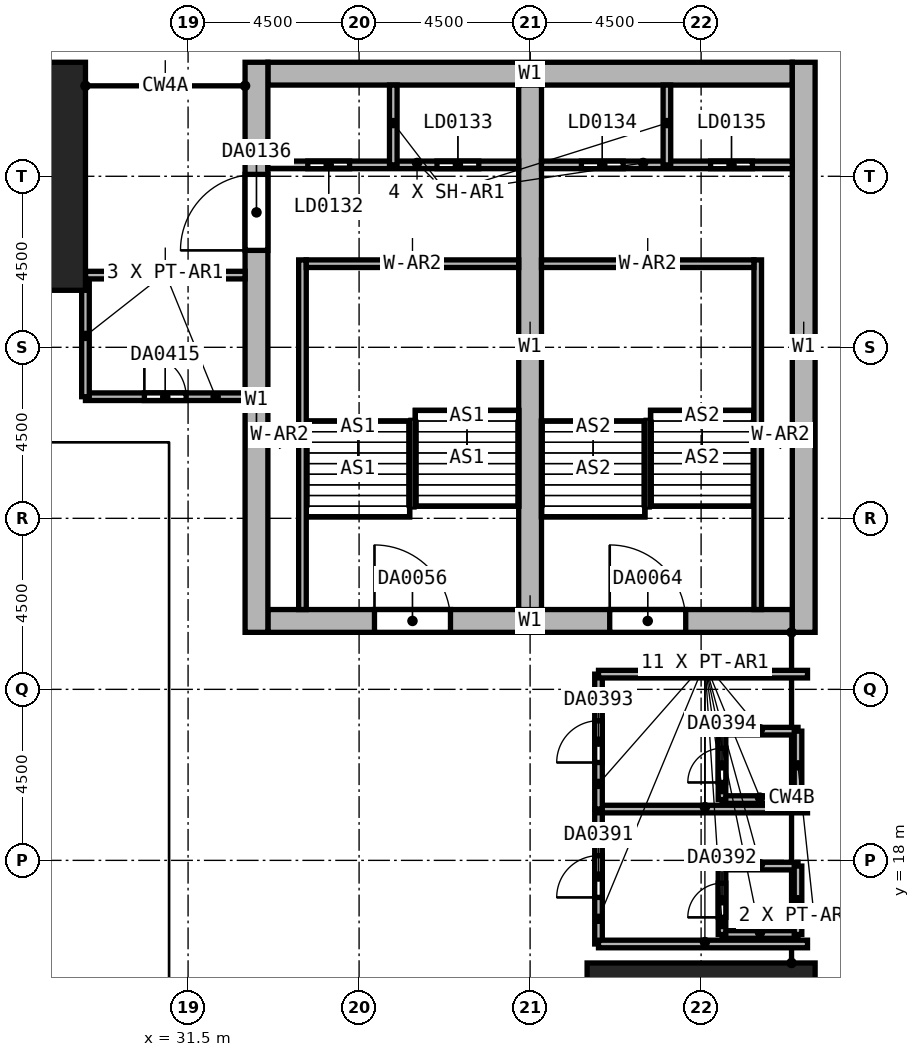
"""IFC4 building model, lengths in metres.
Left out: names, types, materials, properties, quantities, classifications, styles, units other than length and angle.
Written with IfcOpenShell. Run it as: python <this file> out.ifc"""

import sys

from ifc_helpers import new_model, si_unit, direction, frame, frame_2d, origin, origin_2d, place, context, subcontext, project, spatial, rectangle, extrude, element, fill, save


model = new_model("IFC4")
c1 = context("Model", 3, precision=1e-05, world=origin(), true_north=direction((0.0, 1.0)))
c2 = subcontext(c1, "Body", "Model", "MODEL_VIEW")
j1 = project(units=[si_unit("LENGTHUNIT", "METRE"), si_unit("PLANEANGLEUNIT", "RADIAN")], contexts=[c1])
p1 = place(None, origin())
s1 = spatial("IfcSite", under=j1, at=p1, CompositionType="ELEMENT")
p2 = place(p1, origin())
s2 = spatial("IfcBuilding", under=s1, at=p2, CompositionType="ELEMENT")
p3 = place(p2, frame((0.0, 0.0, 25.0)))
s3 = spatial("IfcBuildingStorey", under=s2, at=p3, CompositionType="ELEMENT", Elevation=25.0)
for number, where, z_axis, x_axis in (
    (1, (27.0, 36.0, 0.0), (0.0, 0.0, 1.0), (1.0, 0.0, 0.0)),
    (2, (45.0, 13.5, 0.0), (0.0, 0.0, 1.0), (0.0, 1.0, 0.0)),
):
    element("IfcColumn", number, at=place(p3, frame(where, z_axis=z_axis, x_axis=x_axis)), inside=s3, PredefinedType="COLUMN", context=c2, shape_type="SweptSolid", body=[
        extrude(rectangle(XDim=3.6, YDim=6.0, at=origin_2d()), origin(), (0.0, 0.0, 1.0), 6.0),
    ])
p4 = place(p3, frame((33.6, 38.7, 0.0), z_axis=(0.0, 0.0, 1.0), x_axis=(1.0, 0.0, 0.0)))
e3 = element("IfcWall", 3, at=p4, inside=s3, PredefinedType="SHEAR", context=c2, shape_type="SweptSolid", body=[
    extrude(rectangle(XDim=13.8, YDim=0.6, at=frame_2d((6.9, 0.0))), origin(), (0.0, 0.0, 1.0), 6.0),
])
p5 = place(p3, frame((33.6, 24.3, 0.0), z_axis=(0.0, 0.0, 1.0), x_axis=(1.0, 0.0, 0.0)))
e4 = element("IfcWall", 4, at=p5, inside=s3, PredefinedType="SHEAR", context=c2, shape_type="SweptSolid", body=[
    extrude(rectangle(XDim=13.8, YDim=0.6, at=frame_2d((6.9, 0.0))), origin(), (0.0, 0.0, 1.0), 6.0),
])
p6 = place(p5, frame((2.805, 0.0, 0.0)))
e5 = element("IfcOpeningElement", 5, at=p6, cuts=e4, PredefinedType="OPENING", context=c2, shape_type="SweptSolid", body=[
    extrude(rectangle(XDim=2.0, YDim=2.4, at=frame_2d((1.0, 1.2))), frame((0.0, 0.3, 0.0), z_axis=(0.0, -1.0, 0.0), x_axis=(1.0, 0.0, 0.0)), (0.0, 0.0, 1.0), 0.6),
])
p7 = place(p5, frame((8.995, 0.0, 0.0)))
e6 = element("IfcOpeningElement", 6, at=p7, cuts=e4, PredefinedType="OPENING", context=c2, shape_type="SweptSolid", body=[
    extrude(rectangle(XDim=2.0, YDim=2.4, at=frame_2d((1.0, 1.2))), frame((0.0, 0.3, 0.0), z_axis=(0.0, -1.0, 0.0), x_axis=(1.0, 0.0, 0.0)), (0.0, 0.0, 1.0), 0.6),
])
p8 = place(p3, frame((33.3, 24.0, 0.0), z_axis=(0.0, 0.0, 1.0), x_axis=(0.0, 1.0, 0.0)))
e7 = element("IfcWall", 7, at=p8, inside=s3, PredefinedType="SHEAR", context=c2, shape_type="SweptSolid", body=[
    extrude(rectangle(XDim=15.0, YDim=0.6, at=frame_2d((7.5, 0.0))), origin(), (0.0, 0.0, 1.0), 6.0),
])
p9 = place(p8, frame((10.05, 0.0, 0.0)))
e8 = element("IfcOpeningElement", 8, at=p9, cuts=e7, PredefinedType="OPENING", context=c2, shape_type="SweptSolid", body=[
    extrude(rectangle(XDim=2.0, YDim=2.4, at=frame_2d((1.0, 1.2))), frame((0.0, 0.3, 0.0), z_axis=(0.0, -1.0, 0.0), x_axis=(1.0, 0.0, 0.0)), (0.0, 0.0, 1.0), 0.6),
])
p10 = place(p3, frame((47.7, 24.0, 0.0), z_axis=(0.0, 0.0, 1.0), x_axis=(0.0, 1.0, 0.0)))
e9 = element("IfcWall", 9, at=p10, inside=s3, PredefinedType="SHEAR", context=c2, shape_type="SweptSolid", body=[
    extrude(rectangle(XDim=15.0, YDim=0.6, at=frame_2d((7.5, 0.0))), origin(), (0.0, 0.0, 1.0), 6.0),
])
p11 = place(p3, frame((40.5, 24.6, 0.0), z_axis=(0.0, 0.0, 1.0), x_axis=(0.0, 1.0, 0.0)))
e10 = element("IfcWall", 10, at=p11, inside=s3, PredefinedType="SHEAR", context=c2, shape_type="SweptSolid", body=[
    extrude(rectangle(XDim=13.8, YDim=0.6, at=frame_2d((6.9, 0.0))), origin(), (0.0, 0.0, 1.0), 6.0),
])
p12 = place(p3, frame((34.51, 24.6, 0.0), z_axis=(0.0, 0.0, 1.0), x_axis=(0.0, 1.0, 0.0)))
e11 = element("IfcWall", 11, at=p12, inside=s3, PredefinedType="SOLIDWALL", context=c2, shape_type="SweptSolid", body=[
    extrude(rectangle(XDim=9.2, YDim=0.2, at=frame_2d((4.6, 0.0))), origin(), (0.0, 0.0, 1.0), 6.0),
])
p13 = place(p3, frame((34.61, 33.7, 0.0), z_axis=(0.0, 0.0, 1.0), x_axis=(1.0, 0.0, 0.0)))
e12 = element("IfcWall", 12, at=p13, inside=s3, PredefinedType="SOLIDWALL", context=c2, shape_type="SweptSolid", body=[
    extrude(rectangle(XDim=5.59, YDim=0.2, at=frame_2d((2.795, 0.0))), origin(), (0.0, 0.0, 1.0), 6.0),
])
p14 = place(p3, frame((46.49, 24.6, 0.0), z_axis=(0.0, 0.0, 1.0), x_axis=(0.0, 1.0, 0.0)))
e13 = element("IfcWall", 13, at=p14, inside=s3, PredefinedType="SOLIDWALL", context=c2, shape_type="SweptSolid", body=[
    extrude(rectangle(XDim=9.2, YDim=0.2, at=frame_2d((4.6, 0.0))), origin(), (0.0, 0.0, 1.0), 6.0),
])
p15 = place(p3, frame((40.8, 33.7, 0.0), z_axis=(0.0, 0.0, 1.0), x_axis=(1.0, 0.0, 0.0)))
e14 = element("IfcWall", 14, at=p15, inside=s3, PredefinedType="SOLIDWALL", context=c2, shape_type="SweptSolid", body=[
    extrude(rectangle(XDim=5.59, YDim=0.2, at=frame_2d((2.795, 0.0))), origin(), (0.0, 0.0, 1.0), 6.0),
])
p16 = place(p3, frame((33.6, 36.3, 0.0), z_axis=(0.0, 0.0, 1.0), x_axis=(1.0, 0.0, 0.0)))
e15 = element("IfcWall", 15, at=p16, inside=s3, PredefinedType="SHEAR", context=c2, shape_type="SweptSolid", body=[
    extrude(rectangle(XDim=6.6, YDim=0.2, at=frame_2d((3.3, 0.0))), origin(), (0.0, 0.0, 1.0), 6.0),
])
p17 = place(p16, frame((1.05, 0.0, 0.0)))
e16 = element("IfcOpeningElement", 16, at=p17, cuts=e15, PredefinedType="OPENING", context=c2, shape_type="SweptSolid", body=[
    extrude(rectangle(XDim=1.1, YDim=2.4, at=frame_2d((0.55, 1.2))), frame((0.0, 0.1, 0.0), z_axis=(0.0, -1.0, 0.0), x_axis=(1.0, 0.0, 0.0)), (0.0, 0.0, 1.0), 0.2),
])
p18 = place(p16, frame((4.45, 0.0, 0.0)))
e17 = element("IfcOpeningElement", 17, at=p18, cuts=e15, PredefinedType="OPENING", context=c2, shape_type="SweptSolid", body=[
    extrude(rectangle(XDim=1.1, YDim=2.4, at=frame_2d((0.55, 1.2))), frame((0.0, 0.1, 0.0), z_axis=(0.0, -1.0, 0.0), x_axis=(1.0, 0.0, 0.0)), (0.0, 0.0, 1.0), 0.2),
])
p19 = place(p3, frame((40.8, 36.3, 0.0), z_axis=(0.0, 0.0, 1.0), x_axis=(1.0, 0.0, 0.0)))
e18 = element("IfcWall", 18, at=p19, inside=s3, PredefinedType="SHEAR", context=c2, shape_type="SweptSolid", body=[
    extrude(rectangle(XDim=6.6, YDim=0.2, at=frame_2d((3.3, 0.0))), origin(), (0.0, 0.0, 1.0), 6.0),
])
p20 = place(p19, frame((1.05, 0.0, 0.0)))
e19 = element("IfcOpeningElement", 19, at=p20, cuts=e18, PredefinedType="OPENING", context=c2, shape_type="SweptSolid", body=[
    extrude(rectangle(XDim=1.1, YDim=2.4, at=frame_2d((0.55, 1.2))), frame((0.0, 0.1, 0.0), z_axis=(0.0, -1.0, 0.0), x_axis=(1.0, 0.0, 0.0)), (0.0, 0.0, 1.0), 0.2),
])
p21 = place(p19, frame((4.45, 0.0, 0.0)))
e20 = element("IfcOpeningElement", 20, at=p21, cuts=e18, PredefinedType="OPENING", context=c2, shape_type="SweptSolid", body=[
    extrude(rectangle(XDim=1.1, YDim=2.4, at=frame_2d((0.55, 1.2))), frame((0.0, 0.1, 0.0), z_axis=(0.0, -1.0, 0.0), x_axis=(1.0, 0.0, 0.0)), (0.0, 0.0, 1.0), 0.2),
])
for number, where, z_axis, x_axis in (
    (21, (36.9, 36.3, 0.0), (0.0, 0.0, 1.0), (0.0, 1.0, 0.0)),
    (22, (44.1, 36.3, 0.0), (0.0, 0.0, 1.0), (0.0, 1.0, 0.0)),
):
    element("IfcWall", number, at=place(p3, frame(where, z_axis=z_axis, x_axis=x_axis)), inside=s3, PredefinedType="SHEAR", context=c2, shape_type="SweptSolid", body=[
        extrude(rectangle(XDim=2.1, YDim=0.2, at=frame_2d((1.05, 0.0))), origin(), (0.0, 0.0, 1.0), 6.0),
    ])
p22 = place(p3, frame((42.3, 15.8, 0.0), z_axis=(0.0, 0.0, 1.0), x_axis=(0.0, 1.0, 0.0)))
e23 = element("IfcWall", 23, at=p22, inside=s3, PredefinedType="PARTITIONING", context=c2, shape_type="SweptSolid", body=[
    extrude(rectangle(XDim=3.55, YDim=0.2, at=frame_2d((1.775, 0.0))), origin(), (0.0, 0.0, 1.0), 5.7),
])
p23 = place(p22, frame((1.225, 0.0, 0.0)))
e24 = element("IfcOpeningElement", 24, at=p23, cuts=e23, PredefinedType="OPENING", context=c2, shape_type="SweptSolid", body=[
    extrude(rectangle(XDim=1.1, YDim=2.4, at=frame_2d((0.55, 1.2))), frame((0.0, 0.1, 0.0), z_axis=(0.0, -1.0, 0.0), x_axis=(1.0, 0.0, 0.0)), (0.0, 0.0, 1.0), 0.2),
])
for number, where, z_axis, x_axis in (
    (25, (42.3, 15.8, 0.0), (0.0, 0.0, 1.0), (1.0, 0.0, 0.0)),
    (26, (42.3, 19.35, 0.0), (0.0, 0.0, 1.0), (1.0, 0.0, 0.0)),
):
    element("IfcWall", number, at=place(p3, frame(where, z_axis=z_axis, x_axis=x_axis)), inside=s3, PredefinedType="PARTITIONING", context=c2, shape_type="SweptSolid", body=[
        extrude(rectangle(XDim=5.5, YDim=0.2, at=frame_2d((2.75, 0.0))), origin(), (0.0, 0.0, 1.0), 5.7),
    ])
for number, where, z_axis, x_axis in (
    (27, (45.55, 16.05, 0.0), (0.0, 0.0, 1.0), (1.0, 0.0, 0.0)),
    (28, (47.55, 17.85, 0.0), (0.0, 0.0, 1.0), (-1.0, 0.0, 0.0)),
):
    element("IfcWall", number, at=place(p3, frame(where, z_axis=z_axis, x_axis=x_axis)), inside=s3, PredefinedType="PARTITIONING", context=c2, shape_type="SweptSolid", body=[
        extrude(rectangle(XDim=2.0, YDim=0.2, at=frame_2d((1.0, 0.0))), origin(), (0.0, 0.0, 1.0), 5.7),
    ])
p24 = place(p3, frame((47.55, 16.05, 0.0), z_axis=(0.0, 0.0, 1.0), x_axis=(0.0, 1.0, 0.0)))
e29 = element("IfcWall", 29, at=p24, inside=s3, PredefinedType="PARTITIONING", context=c2, shape_type="SweptSolid", body=[
    extrude(rectangle(XDim=1.8, YDim=0.2, at=frame_2d((0.9, 0.0))), origin(), (0.0, 0.0, 1.0), 4.5),
])
p25 = place(p3, frame((45.55, 16.05, 0.0), z_axis=(0.0, 0.0, 1.0), x_axis=(0.0, 1.0, 0.0)))
e30 = element("IfcWall", 30, at=p25, inside=s3, PredefinedType="PARTITIONING", context=c2, shape_type="SweptSolid", body=[
    extrude(rectangle(XDim=1.8, YDim=0.2, at=frame_2d((0.9, 0.0))), origin(), (0.0, 0.0, 1.0), 5.7),
])
p26 = place(p25, frame((0.45, 0.0, 0.0)))
e31 = element("IfcOpeningElement", 31, at=p26, cuts=e30, PredefinedType="OPENING", context=c2, shape_type="SweptSolid", body=[
    extrude(rectangle(XDim=0.9, YDim=2.1, at=frame_2d((0.45, 1.05))), frame((0.0, 0.1, 0.0), z_axis=(0.0, -1.0, 0.0), x_axis=(1.0, 0.0, 0.0)), (0.0, 0.0, 1.0), 0.2),
])
p27 = place(p3, frame((42.3, 19.35, 0.0), z_axis=(0.0, 0.0, 1.0), x_axis=(0.0, 1.0, 0.0)))
e32 = element("IfcWall", 32, at=p27, inside=s3, PredefinedType="PARTITIONING", context=c2, shape_type="SweptSolid", body=[
    extrude(rectangle(XDim=3.55, YDim=0.2, at=frame_2d((1.775, 0.0))), origin(), (0.0, 0.0, 1.0), 5.7),
])
p28 = place(p27, frame((1.225, 0.0, 0.0)))
e33 = element("IfcOpeningElement", 33, at=p28, cuts=e32, PredefinedType="OPENING", context=c2, shape_type="SweptSolid", body=[
    extrude(rectangle(XDim=1.1, YDim=2.4, at=frame_2d((0.55, 1.2))), frame((0.0, 0.1, 0.0), z_axis=(0.0, -1.0, 0.0), x_axis=(1.0, 0.0, 0.0)), (0.0, 0.0, 1.0), 0.2),
])
p29 = place(p3, frame((42.3, 22.9, 0.0), z_axis=(0.0, 0.0, 1.0), x_axis=(1.0, 0.0, 0.0)))
e34 = element("IfcWall", 34, at=p29, inside=s3, PredefinedType="PARTITIONING", context=c2, shape_type="SweptSolid", body=[
    extrude(rectangle(XDim=5.5, YDim=0.2, at=frame_2d((2.75, 0.0))), origin(), (0.0, 0.0, 1.0), 5.7),
])
for number, where, z_axis, x_axis in (
    (35, (45.55, 19.6, 0.0), (0.0, 0.0, 1.0), (1.0, 0.0, 0.0)),
    (36, (47.55, 21.4, 0.0), (0.0, 0.0, 1.0), (-1.0, 0.0, 0.0)),
):
    element("IfcWall", number, at=place(p3, frame(where, z_axis=z_axis, x_axis=x_axis)), inside=s3, PredefinedType="PARTITIONING", context=c2, shape_type="SweptSolid", body=[
        extrude(rectangle(XDim=2.0, YDim=0.2, at=frame_2d((1.0, 0.0))), origin(), (0.0, 0.0, 1.0), 5.7),
    ])
p30 = place(p3, frame((47.55, 19.6, 0.0), z_axis=(0.0, 0.0, 1.0), x_axis=(0.0, 1.0, 0.0)))
e37 = element("IfcWall", 37, at=p30, inside=s3, PredefinedType="PARTITIONING", context=c2, shape_type="SweptSolid", body=[
    extrude(rectangle(XDim=1.8, YDim=0.2, at=frame_2d((0.9, 0.0))), origin(), (0.0, 0.0, 1.0), 4.5),
])
p31 = place(p3, frame((45.55, 19.6, 0.0), z_axis=(0.0, 0.0, 1.0), x_axis=(0.0, 1.0, 0.0)))
e38 = element("IfcWall", 38, at=p31, inside=s3, PredefinedType="PARTITIONING", context=c2, shape_type="SweptSolid", body=[
    extrude(rectangle(XDim=1.8, YDim=0.2, at=frame_2d((0.9, 0.0))), origin(), (0.0, 0.0, 1.0), 5.7),
])
p32 = place(p31, frame((0.45, 0.0, 0.0)))
e39 = element("IfcOpeningElement", 39, at=p32, cuts=e38, PredefinedType="OPENING", context=c2, shape_type="SweptSolid", body=[
    extrude(rectangle(XDim=0.9, YDim=2.1, at=frame_2d((0.45, 1.05))), frame((0.0, 0.1, 0.0), z_axis=(0.0, -1.0, 0.0), x_axis=(1.0, 0.0, 0.0)), (0.0, 0.0, 1.0), 0.2),
])
p33 = place(p3, frame((28.8, 30.2, 0.0), z_axis=(0.0, 0.0, 1.0), x_axis=(1.0, 0.0, 0.0)))
e40 = element("IfcWall", 40, at=p33, inside=s3, PredefinedType="PARTITIONING", context=c2, shape_type="SweptSolid", body=[
    extrude(rectangle(XDim=4.2, YDim=0.2, at=frame_2d((2.1, 0.0))), origin(), (0.0, 0.0, 1.0), 5.7),
])
p34 = place(p33, frame((1.55, 0.0, 0.0)))
e41 = element("IfcOpeningElement", 41, at=p34, cuts=e40, PredefinedType="OPENING", context=c2, shape_type="SweptSolid", body=[
    extrude(rectangle(XDim=1.1, YDim=2.4, at=frame_2d((0.55, 1.2))), frame((0.0, 0.1, 0.0), z_axis=(0.0, -1.0, 0.0), x_axis=(1.0, 0.0, 0.0)), (0.0, 0.0, 1.0), 0.2),
])
p35 = place(p3, frame((28.8, 30.2, 0.0), z_axis=(0.0, 0.0, 1.0), x_axis=(0.0, 1.0, 0.0)))
e42 = element("IfcWall", 42, at=p35, inside=s3, PredefinedType="PARTITIONING", context=c2, shape_type="SweptSolid", body=[
    extrude(rectangle(XDim=3.2, YDim=0.2, at=frame_2d((1.6, 0.0))), origin(), (0.0, 0.0, 1.0), 5.7),
])
p36 = place(p3, frame((28.8, 33.4, 0.0), z_axis=(0.0, 0.0, 1.0), x_axis=(1.0, 0.0, 0.0)))
e43 = element("IfcWall", 43, at=p36, inside=s3, PredefinedType="PARTITIONING", context=c2, shape_type="SweptSolid", body=[
    extrude(rectangle(XDim=4.2, YDim=0.2, at=frame_2d((2.1, 0.0))), origin(), (0.0, 0.0, 1.0), 5.7),
])
p37 = place(p6, origin())
e44 = element("IfcDoor", 44, at=p37, inside=s3, OperationType="DOUBLE_DOOR_SINGLE_SWING", PredefinedType="DOOR", context=c2, shape_type="SweptSolid", body=[
    extrude(rectangle(XDim=2.0, YDim=2.4, at=frame_2d((1.0, 1.2))), frame((0.0, 0.025, 0.0), z_axis=(0.0, -1.0, 0.0), x_axis=(1.0, 0.0, 0.0)), (0.0, 0.0, 1.0), 0.05),
])
fill(e5, e44)
p38 = place(p7, origin())
e45 = element("IfcDoor", 45, at=p38, inside=s3, OperationType="DOUBLE_DOOR_SINGLE_SWING", PredefinedType="DOOR", context=c2, shape_type="SweptSolid", body=[
    extrude(rectangle(XDim=2.0, YDim=2.4, at=frame_2d((1.0, 1.2))), frame((0.0, 0.025, 0.0), z_axis=(0.0, -1.0, 0.0), x_axis=(1.0, 0.0, 0.0)), (0.0, 0.0, 1.0), 0.05),
])
fill(e6, e45)
p39 = place(p17, origin())
e46 = element("IfcDoor", 46, at=p39, inside=s3, OperationType="DOUBLE_DOOR_SLIDING", PredefinedType="DOOR", context=c2, shape_type="SweptSolid", body=[
    extrude(rectangle(XDim=1.1, YDim=2.4, at=frame_2d((0.55, 1.2))), frame((0.0, 0.025, 0.0), z_axis=(0.0, -1.0, 0.0), x_axis=(1.0, 0.0, 0.0)), (0.0, 0.0, 1.0), 0.05),
])
fill(e16, e46)
p40 = place(p18, origin())
e47 = element("IfcDoor", 47, at=p40, inside=s3, OperationType="DOUBLE_DOOR_SLIDING", PredefinedType="DOOR", context=c2, shape_type="SweptSolid", body=[
    extrude(rectangle(XDim=1.1, YDim=2.4, at=frame_2d((0.55, 1.2))), frame((0.0, 0.025, 0.0), z_axis=(0.0, -1.0, 0.0), x_axis=(1.0, 0.0, 0.0)), (0.0, 0.0, 1.0), 0.05),
])
fill(e17, e47)
p41 = place(p20, origin())
e48 = element("IfcDoor", 48, at=p41, inside=s3, OperationType="DOUBLE_DOOR_SLIDING", PredefinedType="DOOR", context=c2, shape_type="SweptSolid", body=[
    extrude(rectangle(XDim=1.1, YDim=2.4, at=frame_2d((0.55, 1.2))), frame((0.0, 0.025, 0.0), z_axis=(0.0, -1.0, 0.0), x_axis=(1.0, 0.0, 0.0)), (0.0, 0.0, 1.0), 0.05),
])
fill(e19, e48)
p42 = place(p21, origin())
e49 = element("IfcDoor", 49, at=p42, inside=s3, OperationType="DOUBLE_DOOR_SLIDING", PredefinedType="DOOR", context=c2, shape_type="SweptSolid", body=[
    extrude(rectangle(XDim=1.1, YDim=2.4, at=frame_2d((0.55, 1.2))), frame((0.0, 0.025, 0.0), z_axis=(0.0, -1.0, 0.0), x_axis=(1.0, 0.0, 0.0)), (0.0, 0.0, 1.0), 0.05),
])
fill(e20, e49)
p43 = place(p9, origin())
e50 = element("IfcDoor", 50, at=p43, inside=s3, OperationType="DOUBLE_DOOR_SINGLE_SWING", PredefinedType="DOOR", context=c2, shape_type="SweptSolid", body=[
    extrude(rectangle(XDim=2.0, YDim=2.4, at=frame_2d((1.0, 1.2))), frame((0.0, 0.025, 0.0), z_axis=(0.0, -1.0, 0.0), x_axis=(1.0, 0.0, 0.0)), (0.0, 0.0, 1.0), 0.05),
])
fill(e8, e50)
p44 = place(p23, origin())
e51 = element("IfcDoor", 51, at=p44, inside=s3, OperationType="DOUBLE_DOOR_SINGLE_SWING", PredefinedType="DOOR", context=c2, shape_type="SweptSolid", body=[
    extrude(rectangle(XDim=1.1, YDim=2.4, at=frame_2d((0.55, 1.2))), frame((0.0, 0.025, 0.0), z_axis=(0.0, -1.0, 0.0), x_axis=(1.0, 0.0, 0.0)), (0.0, 0.0, 1.0), 0.05),
])
fill(e24, e51)
p45 = place(p26, origin())
e52 = element("IfcDoor", 52, at=p45, inside=s3, OperationType="SINGLE_SWING_LEFT", PredefinedType="DOOR", context=c2, shape_type="SweptSolid", body=[
    extrude(rectangle(XDim=0.9, YDim=2.1, at=frame_2d((0.45, 1.05))), frame((0.0, 0.025, 0.0), z_axis=(0.0, -1.0, 0.0), x_axis=(1.0, 0.0, 0.0)), (0.0, 0.0, 1.0), 0.05),
])
fill(e31, e52)
p46 = place(p28, origin())
e53 = element("IfcDoor", 53, at=p46, inside=s3, OperationType="DOUBLE_DOOR_SINGLE_SWING", PredefinedType="DOOR", context=c2, shape_type="SweptSolid", body=[
    extrude(rectangle(XDim=1.1, YDim=2.4, at=frame_2d((0.55, 1.2))), frame((0.0, 0.025, 0.0), z_axis=(0.0, -1.0, 0.0), x_axis=(1.0, 0.0, 0.0)), (0.0, 0.0, 1.0), 0.05),
])
fill(e33, e53)
p47 = place(p32, origin())
e54 = element("IfcDoor", 54, at=p47, inside=s3, OperationType="SINGLE_SWING_LEFT", PredefinedType="DOOR", context=c2, shape_type="SweptSolid", body=[
    extrude(rectangle(XDim=0.9, YDim=2.1, at=frame_2d((0.45, 1.05))), frame((0.0, 0.025, 0.0), z_axis=(0.0, -1.0, 0.0), x_axis=(1.0, 0.0, 0.0)), (0.0, 0.0, 1.0), 0.05),
])
fill(e39, e54)
p48 = place(p34, origin())
e55 = element("IfcDoor", 55, at=p48, inside=s3, OperationType="DOUBLE_DOOR_SINGLE_SWING", PredefinedType="DOOR", context=c2, shape_type="SweptSolid", body=[
    extrude(rectangle(XDim=1.1, YDim=2.4, at=frame_2d((0.55, 1.2))), frame((0.0, 0.025, 0.0), z_axis=(0.0, -1.0, 0.0), x_axis=(1.0, 0.0, 0.0)), (0.0, 0.0, 1.0), 0.05),
])
fill(e41, e55)
save(model, sys.argv[1])
